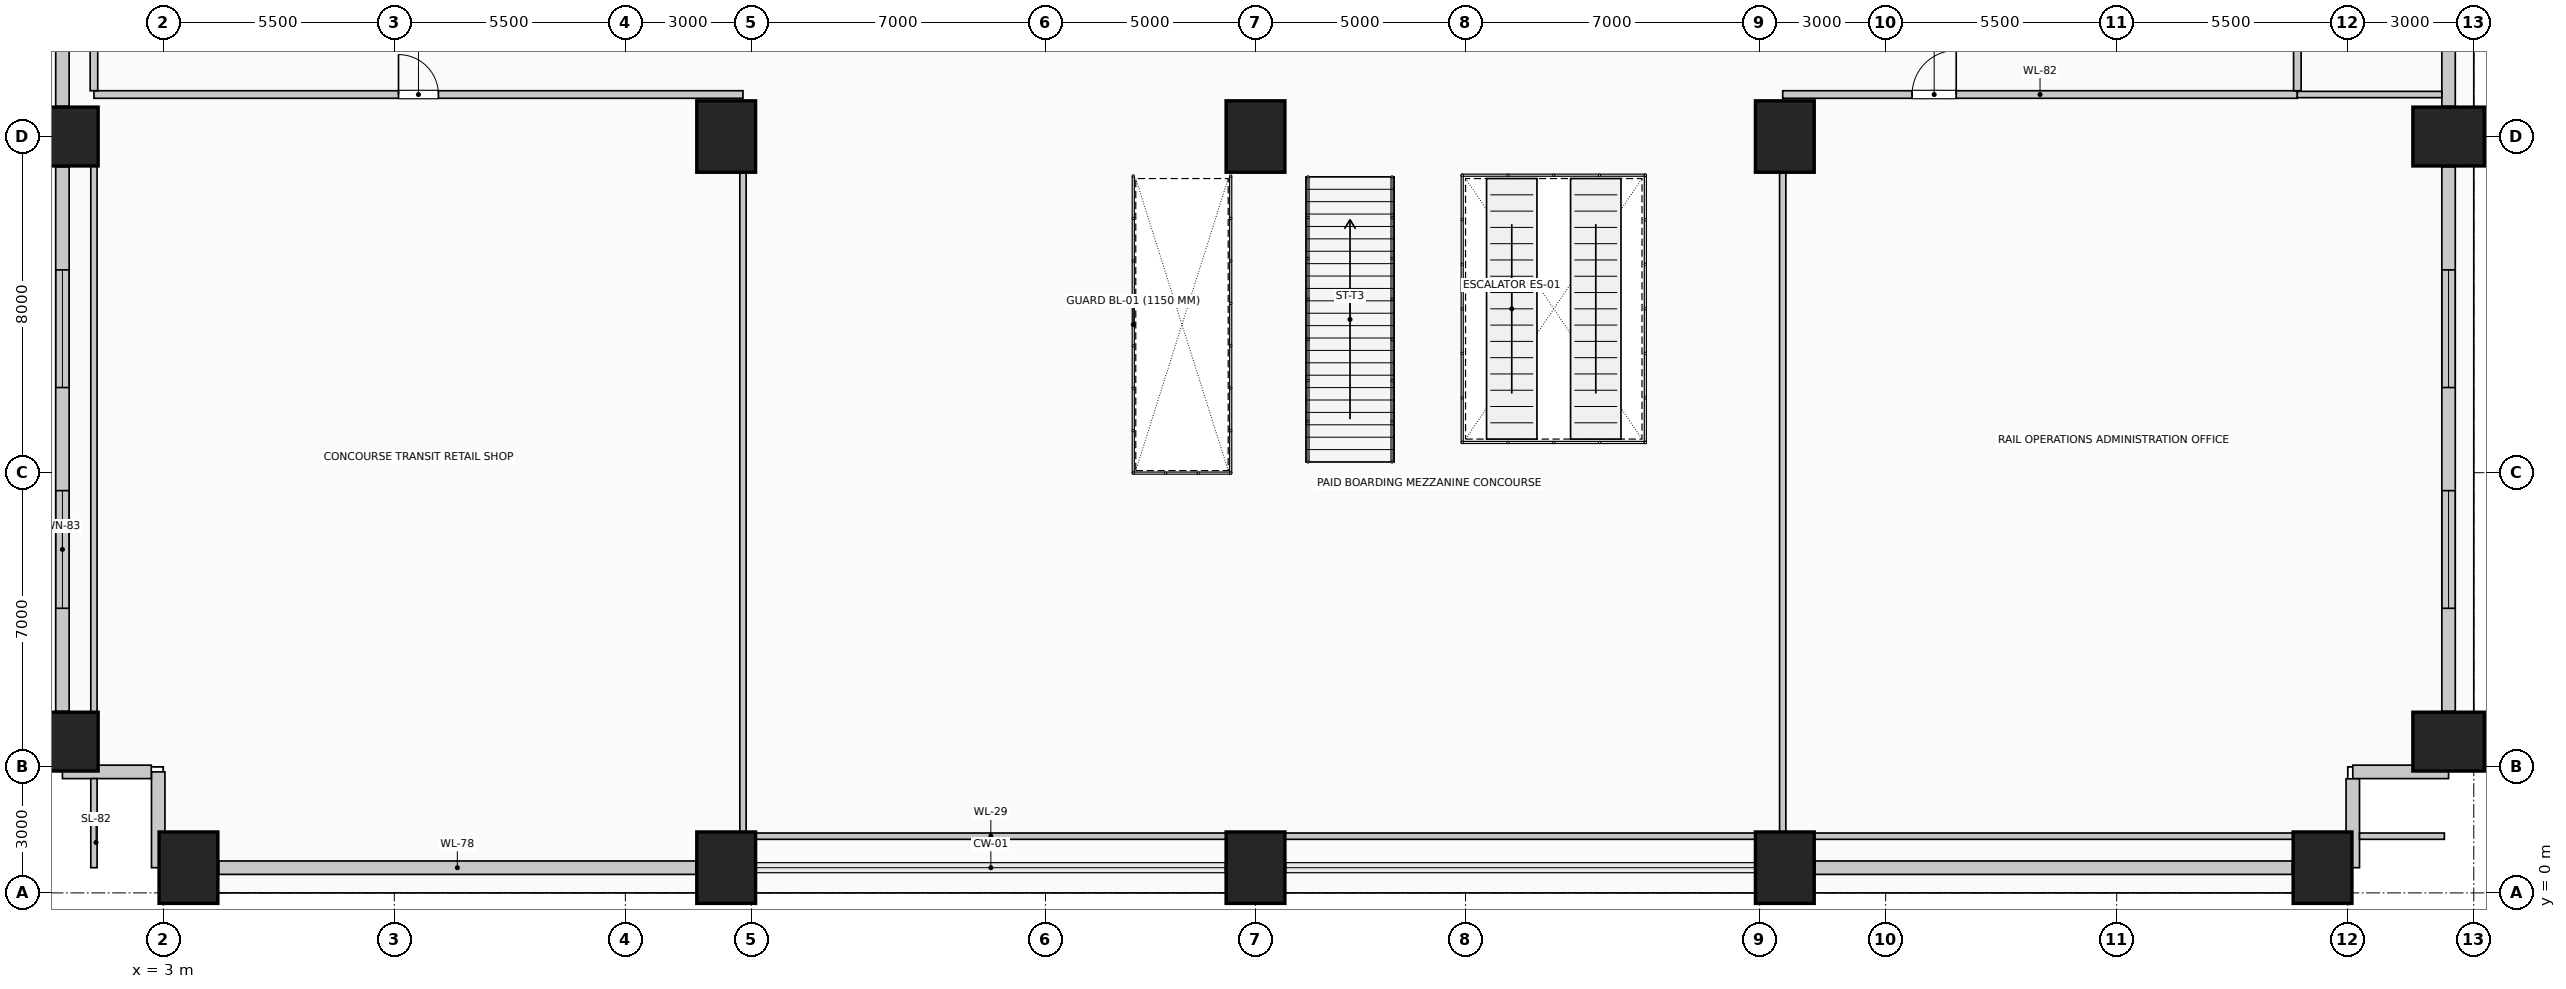
"""IFC4 building model, lengths in metres.
Left out: names, types, materials, properties, quantities, classifications, styles, units other than length and angle.
Written with IfcOpenShell. Run it as: python <this file> out.ifc"""

import sys

from ifc_helpers import new_model, si_unit, direction, frame, frame_2d, origin, origin_2d, place, context, subcontext, project, spatial, rectangle, extrude, element, fill, save


model = new_model("IFC4")
c1 = context("Model", 3, precision=1e-05, world=origin(), true_north=direction((0.0, 1.0)))
c2 = subcontext(c1, "Body", "Model", "MODEL_VIEW")
j1 = project(units=[si_unit("LENGTHUNIT", "METRE"), si_unit("PLANEANGLEUNIT", "RADIAN")], contexts=[c1])
p1 = place(None, origin())
s1 = spatial("IfcSite", under=j1, at=p1, CompositionType="ELEMENT")
p2 = place(p1, origin())
s2 = spatial("IfcBuilding", under=s1, at=p2, CompositionType="ELEMENT")
p3 = place(p2, frame((0.0, 0.0, 9.45)))
s3 = spatial("IfcBuildingStorey", under=s2, at=p3, CompositionType="ELEMENT", Elevation=9.45)
for number, where, z_axis, x_axis in (
    (1, (3.6, 0.6, 0.0), (0.0, 0.0, 1.0), (1.0, 0.0, 0.0)),
    (2, (16.4, 0.6, 0.0), (0.0, 0.0, 1.0), (1.0, 0.0, 0.0)),
    (3, (29.0, 0.6, 0.0), (0.0, 0.0, 1.0), (1.0, 0.0, 0.0)),
    (4, (41.6, 0.6, 0.0), (0.0, 0.0, 1.0), (1.0, 0.0, 0.0)),
    (5, (54.4, 0.6, 0.0), (0.0, 0.0, 1.0), (1.0, 0.0, 0.0)),
    (6, (0.6, 3.6, 0.0), (0.0, 0.0, 1.0), (0.0, 1.0, 0.0)),
    (7, (57.4, 3.6, 0.0), (0.0, 0.0, 1.0), (0.0, 1.0, 0.0)),
    (8, (0.6, 18.0, 0.0), (0.0, 0.0, 1.0), (0.0, 1.0, 0.0)),
    (9, (57.4, 18.0, 0.0), (0.0, 0.0, 1.0), (0.0, 1.0, 0.0)),
    (10, (16.4, 18.0, 0.0), (0.0, 0.0, 1.0), (1.0, 0.0, 0.0)),
    (11, (29.0, 18.0, 0.0), (0.0, 0.0, 1.0), (1.0, 0.0, 0.0)),
    (12, (41.6, 18.0, 0.0), (0.0, 0.0, 1.0), (1.0, 0.0, 0.0)),
):
    element("IfcColumn", number, at=place(p3, frame(where, z_axis=z_axis, x_axis=x_axis)), inside=s3, PredefinedType="COLUMN", context=c2, shape_type="SweptSolid", body=[
        extrude(rectangle(XDim=1.4, YDim=1.7, at=origin_2d()), origin(), (0.0, 0.0, 1.0), 4.05),
    ])
for number, where, z_axis, x_axis in (
    (13, (15.68, 0.6, 0.0), (0.0, 0.0, 1.0), (-1.0, 0.0, 0.0)),
    (14, (53.68, 0.6, 0.0), (0.0, 0.0, 1.0), (-1.0, 0.0, 0.0)),
):
    element("IfcWall", number, at=place(p3, frame(where, z_axis=z_axis, x_axis=x_axis)), inside=s3, PredefinedType="SOLIDWALL", context=c2, shape_type="SweptSolid", body=[
        extrude(rectangle(XDim=11.36, YDim=0.32, at=frame_2d((5.68, 0.0))), origin(), (0.0, 0.0, 1.0), 2.7),
    ])
p4 = place(p3, frame((0.6, 4.32, 0.0), z_axis=(0.0, 0.0, 1.0), x_axis=(0.0, 1.0, 0.0)))
e15 = element("IfcWall", 15, at=p4, inside=s3, PredefinedType="SOLIDWALL", context=c2, shape_type="SweptSolid", body=[
    extrude(rectangle(XDim=12.96, YDim=0.32, at=frame_2d((6.48, 0.0))), origin(), (0.0, 0.0, 1.0), 2.7),
])
p5 = place(p4, frame((2.453, 0.0, 0.45)))
e16 = element("IfcOpeningElement", 16, at=p5, cuts=e15, PredefinedType="OPENING", context=c2, shape_type="SweptSolid", body=[
    extrude(rectangle(XDim=2.8, YDim=2.1, at=frame_2d((1.4, 1.05))), frame((0.0, 0.17, 0.0), z_axis=(0.0, -1.0, 0.0), x_axis=(1.0, 0.0, 0.0)), (0.0, 0.0, 1.0), 0.34),
])
p6 = place(p4, frame((7.707, 0.0, 0.45)))
e17 = element("IfcOpeningElement", 17, at=p6, cuts=e15, PredefinedType="OPENING", context=c2, shape_type="SweptSolid", body=[
    extrude(rectangle(XDim=2.8, YDim=2.1, at=frame_2d((1.4, 1.05))), frame((0.0, 0.17, 0.0), z_axis=(0.0, -1.0, 0.0), x_axis=(1.0, 0.0, 0.0)), (0.0, 0.0, 1.0), 0.34),
])
p7 = place(p3, frame((0.6, 18.72, 0.0), z_axis=(0.0, 0.0, 1.0), x_axis=(0.0, 1.0, 0.0)))
e18 = element("IfcWall", 18, at=p7, inside=s3, PredefinedType="SOLIDWALL", context=c2, shape_type="SweptSolid", body=[
    extrude(rectangle(XDim=14.56, YDim=0.32, at=frame_2d((7.28, 0.0))), origin(), (0.0, 0.0, 1.0), 2.7),
])
p8 = place(p3, frame((57.4, 17.28, 0.0), z_axis=(0.0, 0.0, 1.0), x_axis=(0.0, -1.0, 0.0)))
e19 = element("IfcWall", 19, at=p8, inside=s3, PredefinedType="SOLIDWALL", context=c2, shape_type="SweptSolid", body=[
    extrude(rectangle(XDim=12.96, YDim=0.32, at=frame_2d((6.48, 0.0))), origin(), (0.0, 0.0, 1.0), 2.7),
])
p9 = place(p8, frame((2.453, 0.0, 0.45)))
e20 = element("IfcOpeningElement", 20, at=p9, cuts=e19, PredefinedType="OPENING", context=c2, shape_type="SweptSolid", body=[
    extrude(rectangle(XDim=2.8, YDim=2.1, at=frame_2d((1.4, 1.05))), frame((0.0, 0.17, 0.0), z_axis=(0.0, -1.0, 0.0), x_axis=(1.0, 0.0, 0.0)), (0.0, 0.0, 1.0), 0.34),
])
p10 = place(p8, frame((7.707, 0.0, 0.45)))
e21 = element("IfcOpeningElement", 21, at=p10, cuts=e19, PredefinedType="OPENING", context=c2, shape_type="SweptSolid", body=[
    extrude(rectangle(XDim=2.8, YDim=2.1, at=frame_2d((1.4, 1.05))), frame((0.0, 0.17, 0.0), z_axis=(0.0, -1.0, 0.0), x_axis=(1.0, 0.0, 0.0)), (0.0, 0.0, 1.0), 0.34),
])
p11 = place(p3, frame((57.4, 33.28, 0.0), z_axis=(0.0, 0.0, 1.0), x_axis=(0.0, -1.0, 0.0)))
e22 = element("IfcWall", 22, at=p11, inside=s3, PredefinedType="SOLIDWALL", context=c2, shape_type="SweptSolid", body=[
    extrude(rectangle(XDim=14.56, YDim=0.32, at=frame_2d((7.28, 0.0))), origin(), (0.0, 0.0, 1.0), 2.7),
])
p12 = place(p3, frame((57.4, 2.88, 0.0), z_axis=(0.0, 0.0, 1.0), x_axis=(-1.0, 0.0, 0.0)))
e23 = element("IfcWall", 23, at=p12, inside=s3, PredefinedType="SOLIDWALL", context=c2, shape_type="SweptSolid", body=[
    extrude(rectangle(XDim=2.28, YDim=0.32, at=frame_2d((1.14, 0.0))), origin(), (0.0, 0.0, 1.0), 3.65),
])
p13 = place(p3, frame((55.12, 2.715, 0.0), z_axis=(0.0, 0.0, 1.0), x_axis=(0.0, -1.0, 0.0)))
e24 = element("IfcWall", 24, at=p13, inside=s3, PredefinedType="SOLIDWALL", context=c2, shape_type="SweptSolid", body=[
    extrude(rectangle(XDim=2.115, YDim=0.32, at=frame_2d((1.058, 0.0))), origin(), (0.0, 0.0, 1.0), 3.65),
])
p14 = place(p3, frame((2.88, 0.6, 0.0), z_axis=(0.0, 0.0, 1.0), x_axis=(0.0, 1.0, 0.0)))
e25 = element("IfcWall", 25, at=p14, inside=s3, PredefinedType="SOLIDWALL", context=c2, shape_type="SweptSolid", body=[
    extrude(rectangle(XDim=2.28, YDim=0.32, at=frame_2d((1.14, 0.0))), origin(), (0.0, 0.0, 1.0), 3.65),
])
p15 = place(p3, frame((2.715, 2.88, 0.0), z_axis=(0.0, 0.0, 1.0), x_axis=(-1.0, 0.0, 0.0)))
e26 = element("IfcWall", 26, at=p15, inside=s3, PredefinedType="SOLIDWALL", context=c2, shape_type="SweptSolid", body=[
    extrude(rectangle(XDim=2.115, YDim=0.32, at=frame_2d((1.058, 0.0))), origin(), (0.0, 0.0, 1.0), 3.65),
])
for number, where, z_axis, x_axis in (
    (27, (17.1, 1.35, 0.0), (0.0, 0.0, 1.0), (1.0, 0.0, 0.0)),
    (28, (29.7, 1.35, 0.0), (0.0, 0.0, 1.0), (1.0, 0.0, 0.0)),
):
    element("IfcWall", number, at=place(p3, frame(where, z_axis=z_axis, x_axis=x_axis)), inside=s3, PredefinedType="PARTITIONING", context=c2, shape_type="SweptSolid", body=[
        extrude(rectangle(XDim=11.2, YDim=0.15, at=frame_2d((5.6, 0.0))), origin(), (0.0, 0.0, 1.0), 3.65),
    ])
p16 = place(p3, frame((42.3, 1.35, 0.0), z_axis=(0.0, 0.0, 1.0), x_axis=(1.0, 0.0, 0.0)))
e29 = element("IfcWall", 29, at=p16, inside=s3, PredefinedType="PARTITIONING", context=c2, shape_type="SweptSolid", body=[
    extrude(rectangle(XDim=11.4, YDim=0.15, at=frame_2d((5.7, 0.0))), origin(), (0.0, 0.0, 1.0), 3.65),
])
p17 = place(p3, frame((55.28, 1.35, 0.0), z_axis=(0.0, 0.0, 1.0), x_axis=(1.0, 0.0, 0.0)))
e30 = element("IfcWall", 30, at=p17, inside=s3, PredefinedType="PARTITIONING", context=c2, shape_type="SweptSolid", body=[
    extrude(rectangle(XDim=2.02, YDim=0.15, at=frame_2d((1.01, 0.0))), origin(), (0.0, 0.0, 1.0), 3.65),
])
p18 = place(p3, frame((1.35, 19.0, 0.0), z_axis=(0.0, 0.0, 1.0), x_axis=(1.0, 0.0, 0.0)))
e31 = element("IfcWall", 31, at=p18, inside=s3, PredefinedType="PARTITIONING", context=c2, shape_type="SweptSolid", body=[
    extrude(rectangle(XDim=15.45, YDim=0.18, at=frame_2d((7.725, 0.0))), origin(), (0.0, 0.0, 1.0), 3.65),
])
p19 = place(p18, frame((7.25, 0.0, 0.0)))
e32 = element("IfcOpeningElement", 32, at=p19, cuts=e31, PredefinedType="OPENING", context=c2, shape_type="SweptSolid", body=[
    extrude(rectangle(XDim=0.95, YDim=2.15, at=frame_2d((0.475, 1.075))), frame((0.0, 0.1, 0.0), z_axis=(0.0, -1.0, 0.0), x_axis=(1.0, 0.0, 0.0)), (0.0, 0.0, 1.0), 0.2),
])
p20 = place(p3, frame((41.55, 19.0, 0.0), z_axis=(0.0, 0.0, 1.0), x_axis=(1.0, 0.0, 0.0)))
e33 = element("IfcWall", 33, at=p20, inside=s3, PredefinedType="PARTITIONING", context=c2, shape_type="SweptSolid", body=[
    extrude(rectangle(XDim=12.25, YDim=0.18, at=frame_2d((6.125, 0.0))), origin(), (0.0, 0.0, 1.0), 3.65),
])
p21 = place(p20, frame((3.08, 0.0, 0.0)))
e34 = element("IfcOpeningElement", 34, at=p21, cuts=e33, PredefinedType="OPENING", context=c2, shape_type="SweptSolid", body=[
    extrude(rectangle(XDim=1.05, YDim=2.15, at=frame_2d((0.525, 1.075))), frame((0.0, 0.1, 0.0), z_axis=(0.0, -1.0, 0.0), x_axis=(1.0, 0.0, 0.0)), (0.0, 0.0, 1.0), 0.2),
])
p22 = place(p3, frame((53.8, 19.0, 0.0), z_axis=(0.0, 0.0, 1.0), x_axis=(1.0, 0.0, 0.0)))
e35 = element("IfcWall", 35, at=p22, inside=s3, PredefinedType="PARTITIONING", context=c2, shape_type="SweptSolid", body=[
    extrude(rectangle(XDim=3.44, YDim=0.15, at=frame_2d((1.72, 0.0))), origin(), (0.0, 0.0, 1.0), 3.65),
])
p23 = place(p3, frame((1.35, 0.6, 0.0), z_axis=(0.0, 0.0, 1.0), x_axis=(0.0, 1.0, 0.0)))
e36 = element("IfcWall", 36, at=p23, inside=s3, PredefinedType="PARTITIONING", context=c2, shape_type="SweptSolid", body=[
    extrude(rectangle(XDim=2.12, YDim=0.15, at=frame_2d((1.06, 0.0))), origin(), (0.0, 0.0, 1.0), 3.65),
])
p24 = place(p3, frame((1.35, 4.3, 0.0), z_axis=(0.0, 0.0, 1.0), x_axis=(0.0, 1.0, 0.0)))
e37 = element("IfcWall", 37, at=p24, inside=s3, PredefinedType="PARTITIONING", context=c2, shape_type="SweptSolid", body=[
    extrude(rectangle(XDim=13.0, YDim=0.15, at=frame_2d((6.5, 0.0))), origin(), (0.0, 0.0, 1.0), 3.65),
])
p25 = place(p3, frame((1.35, 19.09, 0.0), z_axis=(0.0, 0.0, 1.0), x_axis=(0.0, 1.0, 0.0)))
e38 = element("IfcWall", 38, at=p25, inside=s3, PredefinedType="PARTITIONING", context=c2, shape_type="SweptSolid", body=[
    extrude(rectangle(XDim=1.11, YDim=0.18, at=frame_2d((0.555, 0.0))), origin(), (0.0, 0.0, 1.0), 3.65),
])
for number, where, z_axis, x_axis in (
    (39, (16.8, 1.45, 0.0), (0.0, 0.0, 1.0), (0.0, 1.0, 0.0)),
    (40, (41.55, 1.45, 0.0), (0.0, 0.0, 1.0), (0.0, 1.0, 0.0)),
):
    element("IfcWall", number, at=place(p3, frame(where, z_axis=z_axis, x_axis=x_axis)), inside=s3, PredefinedType="PARTITIONING", context=c2, shape_type="SweptSolid", body=[
        extrude(rectangle(XDim=15.7, YDim=0.15, at=frame_2d((7.85, 0.0))), origin(), (0.0, 0.0, 1.0), 2.695),
    ])
p26 = place(p3, frame((53.8, 19.09, 0.0), z_axis=(0.0, 0.0, 1.0), x_axis=(0.0, 1.0, 0.0)))
e41 = element("IfcWall", 41, at=p26, inside=s3, PredefinedType="PARTITIONING", context=c2, shape_type="SweptSolid", body=[
    extrude(rectangle(XDim=1.02, YDim=0.18, at=frame_2d((0.51, 0.0))), origin(), (0.0, 0.0, 1.0), 3.65),
])
p27 = place(p5, origin())
e42 = element("IfcWindow", 42, at=p27, inside=s3, PartitioningType="SINGLE_PANEL", PredefinedType="WINDOW", context=c2, shape_type="SweptSolid", body=[
    extrude(rectangle(XDim=2.8, YDim=2.1, at=frame_2d((1.4, 1.05))), frame((0.0, 0.03, 0.0), z_axis=(0.0, -1.0, 0.0), x_axis=(1.0, 0.0, 0.0)), (0.0, 0.0, 1.0), 0.06),
])
fill(e16, e42)
p28 = place(p6, origin())
e43 = element("IfcWindow", 43, at=p28, inside=s3, PartitioningType="SINGLE_PANEL", PredefinedType="WINDOW", context=c2, shape_type="SweptSolid", body=[
    extrude(rectangle(XDim=2.8, YDim=2.1, at=frame_2d((1.4, 1.05))), frame((0.0, 0.03, 0.0), z_axis=(0.0, -1.0, 0.0), x_axis=(1.0, 0.0, 0.0)), (0.0, 0.0, 1.0), 0.06),
])
fill(e17, e43)
p29 = place(p9, origin())
e44 = element("IfcWindow", 44, at=p29, inside=s3, PartitioningType="SINGLE_PANEL", PredefinedType="WINDOW", context=c2, shape_type="SweptSolid", body=[
    extrude(rectangle(XDim=2.8, YDim=2.1, at=frame_2d((1.4, 1.05))), frame((0.0, 0.03, 0.0), z_axis=(0.0, -1.0, 0.0), x_axis=(1.0, 0.0, 0.0)), (0.0, 0.0, 1.0), 0.06),
])
fill(e20, e44)
p30 = place(p10, origin())
e45 = element("IfcWindow", 45, at=p30, inside=s3, PartitioningType="SINGLE_PANEL", PredefinedType="WINDOW", context=c2, shape_type="SweptSolid", body=[
    extrude(rectangle(XDim=2.8, YDim=2.1, at=frame_2d((1.4, 1.05))), frame((0.0, 0.03, 0.0), z_axis=(0.0, -1.0, 0.0), x_axis=(1.0, 0.0, 0.0)), (0.0, 0.0, 1.0), 0.06),
])
fill(e21, e45)
p31 = place(p19, origin())
e46 = element("IfcDoor", 46, at=p31, inside=s3, OperationType="SINGLE_SWING_LEFT", PredefinedType="DOOR", context=c2, shape_type="SweptSolid", body=[
    extrude(rectangle(XDim=0.95, YDim=2.15, at=frame_2d((0.475, 1.075))), frame((0.0, 0.025, 0.0), z_axis=(0.0, -1.0, 0.0), x_axis=(1.0, 0.0, 0.0)), (0.0, 0.0, 1.0), 0.05),
])
fill(e32, e46)
p32 = place(p21, origin())
e47 = element("IfcDoor", 47, at=p32, inside=s3, OperationType="SINGLE_SWING_RIGHT", PredefinedType="DOOR", context=c2, shape_type="SweptSolid", body=[
    extrude(rectangle(XDim=1.05, YDim=2.15, at=frame_2d((0.525, 1.075))), frame((0.0, 0.025, 0.0), z_axis=(0.0, -1.0, 0.0), x_axis=(1.0, 0.0, 0.0)), (0.0, 0.0, 1.0), 0.05),
])
fill(e34, e47)
save(model, sys.argv[1])
